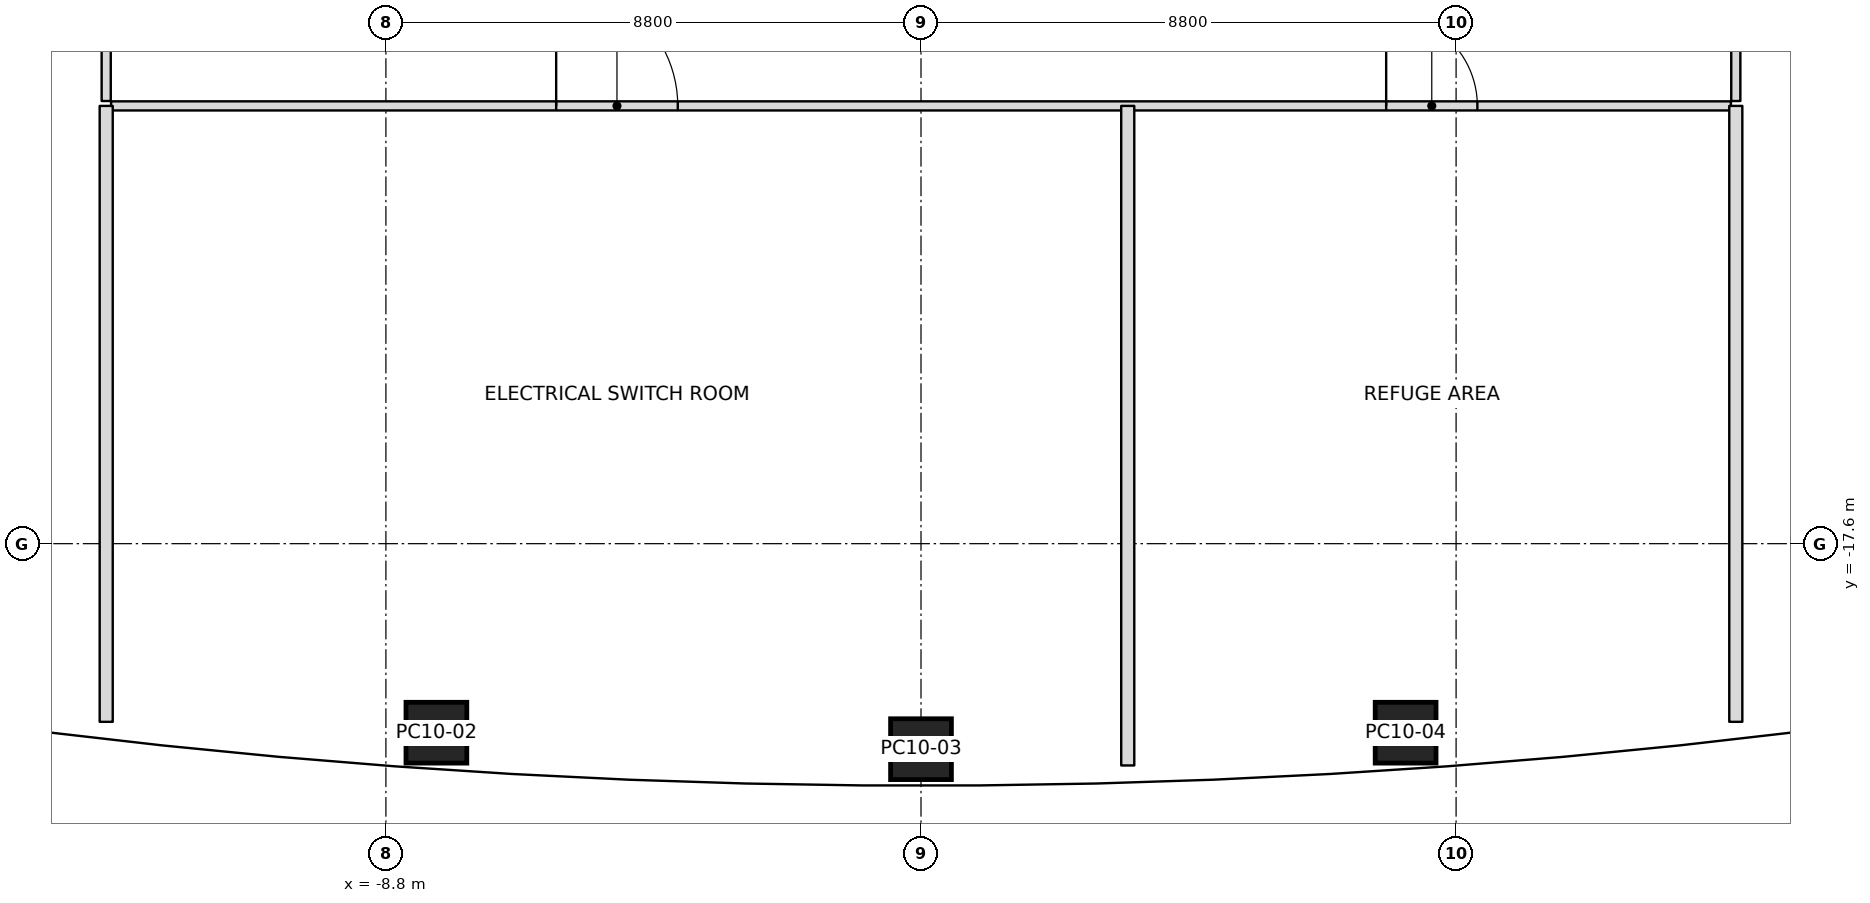
"""IFC4 building model, lengths in metres.
Left out: names, types, materials, properties, quantities, classifications, styles, units other than length and angle.
Written with IfcOpenShell. Run it as: python <this file> out.ifc"""

import sys

from ifc_helpers import new_model, si_unit, direction, frame, frame_2d, origin, origin_2d, place, context, subcontext, project, spatial, rectangle, extrude, clip, halfspace, element, fill, save


model = new_model("IFC4")
c1 = context("Model", 3, precision=1e-05, world=origin(), true_north=direction((0.0, 1.0)))
c2 = subcontext(c1, "Body", "Model", "MODEL_VIEW")
j1 = project(units=[si_unit("LENGTHUNIT", "METRE"), si_unit("PLANEANGLEUNIT", "RADIAN")], contexts=[c1])
p1 = place(None, origin())
s1 = spatial("IfcSite", under=j1, at=p1, CompositionType="ELEMENT")
p2 = place(p1, origin())
s2 = spatial("IfcBuilding", under=s1, at=p2, CompositionType="ELEMENT")
p3 = place(p2, frame((0.0, 0.0, 213.8)))
s3 = spatial("IfcBuildingStorey", under=s2, at=p3, CompositionType="ELEMENT", Elevation=213.8)
p4 = place(p3, frame((-7.97, -20.709, 0.0), z_axis=(0.005859111992, 0.007445954823, 0.999955113274), x_axis=(-0.997671899691, 0.067987281987, 0.005339480833)))
e1 = element("IfcColumn", 1, at=p4, inside=s3, PredefinedType="COLUMN", context=c2, shape_type="SweptSolid", body=[
    clip(clip(extrude(rectangle(XDim=1.0, YDim=1.0, at=origin_2d()), origin(), (0.0, 0.0, 1.0), 6.0), halfspace(frame((0.0, 0.0, 0.002)), True)), halfspace(frame((0.0, 0.0, 6.0)), False)),
])
p5 = place(p3, frame((0.0, -20.98, 0.0), z_axis=(0.0, 0.007608829216, 0.99997105244), x_axis=(1.0, 0.0, 0.0)))
e2 = element("IfcColumn", 2, at=p5, inside=s3, PredefinedType="COLUMN", context=c2, shape_type="SweptSolid", body=[
    clip(clip(extrude(rectangle(XDim=1.0, YDim=1.0, at=origin_2d()), origin(), (0.0, 0.0, 1.0), 6.0), halfspace(frame((0.0, 0.0, 0.001)), True)), halfspace(frame((0.0, 0.0, 6.0)), False)),
])
p6 = place(p3, frame((7.97, -20.709, 0.0), z_axis=(-0.005859111992, 0.007445954823, 0.999955113274), x_axis=(0.997671899691, 0.067987281987, 0.005339480833)))
e3 = element("IfcColumn", 3, at=p6, inside=s3, PredefinedType="COLUMN", context=c2, shape_type="SweptSolid", body=[
    clip(clip(extrude(rectangle(XDim=1.0, YDim=1.0, at=origin_2d()), origin(), (0.0, 0.0, 1.0), 6.0), halfspace(frame((0.0, 0.0, 0.002)), True)), halfspace(frame((0.0, 0.0, 6.0)), False)),
])
p7 = place(p3, frame((-13.4, -10.4, 0.0), z_axis=(0.0, 0.0, 1.0), x_axis=(0.0, -1.0, 0.0)))
e4 = element("IfcWall", 4, at=p7, inside=s3, PredefinedType="PARTITIONING", context=c2, shape_type="SweptSolid", body=[
    extrude(rectangle(XDim=10.13, YDim=0.215, at=frame_2d((5.065, 0.0))), origin(), (0.0, 0.0, 1.0), 5.234),
])
p8 = place(p3, frame((3.4, -10.4, 0.0), z_axis=(0.0, 0.0, 1.0), x_axis=(0.0, -1.0, 0.0)))
e5 = element("IfcWall", 5, at=p8, inside=s3, PredefinedType="PARTITIONING", context=c2, shape_type="SweptSolid", body=[
    extrude(rectangle(XDim=10.848, YDim=0.215, at=frame_2d((5.424, 0.0))), origin(), (0.0, 0.0, 1.0), 5.234),
])
p9 = place(p3, frame((13.4, -10.4, 0.0), z_axis=(0.0, 0.0, 1.0), x_axis=(0.0, -1.0, 0.0)))
e6 = element("IfcWall", 6, at=p9, inside=s3, PredefinedType="PARTITIONING", context=c2, shape_type="SweptSolid", body=[
    extrude(rectangle(XDim=10.13, YDim=0.215, at=frame_2d((5.065, 0.0))), origin(), (0.0, 0.0, 1.0), 5.234),
])
p10 = place(p3, frame((-13.4, 10.32, 0.0), z_axis=(0.0, 0.0, 1.0), x_axis=(0.0, -1.0, 0.0)))
e7 = element("IfcWall", 7, at=p10, inside=s3, PredefinedType="PARTITIONING", context=c2, shape_type="SweptSolid", body=[
    extrude(rectangle(XDim=20.64, YDim=0.15, at=frame_2d((10.32, 0.0))), origin(), (0.0, 0.0, 1.0), 5.233),
])
p11 = place(p10, frame((3.32, 0.0, 0.0)))
e8 = element("IfcOpeningElement", 8, at=p11, cuts=e7, PredefinedType="OPENING", context=c2, shape_type="SweptSolid", body=[
    extrude(rectangle(XDim=1.0, YDim=2.4, at=frame_2d((0.5, 1.2))), frame((0.0, 0.075, 0.0), z_axis=(0.0, -1.0, 0.0), x_axis=(1.0, 0.0, 0.0)), (0.0, 0.0, 1.0), 0.15),
])
p12 = place(p10, frame((13.23, 0.0, 0.0)))
e9 = element("IfcOpeningElement", 9, at=p12, cuts=e7, PredefinedType="OPENING", context=c2, shape_type="SweptSolid", body=[
    extrude(rectangle(XDim=2.0, YDim=2.4, at=frame_2d((1.0, 1.2))), frame((0.0, 0.075, 0.0), z_axis=(0.0, -1.0, 0.0), x_axis=(1.0, 0.0, 0.0)), (0.0, 0.0, 1.0), 0.15),
])
p13 = place(p3, frame((-13.32, -10.4, 0.0), z_axis=(0.0, 0.0, 1.0), x_axis=(1.0, 0.0, 0.0)))
e10 = element("IfcWall", 10, at=p13, inside=s3, PredefinedType="PARTITIONING", context=c2, shape_type="SweptSolid", body=[
    extrude(rectangle(XDim=26.64, YDim=0.15, at=frame_2d((13.32, 0.0))), origin(), (0.0, 0.0, 1.0), 5.317),
])
p14 = place(p13, frame((7.32, 0.0, 0.0)))
e11 = element("IfcOpeningElement", 11, at=p14, cuts=e10, PredefinedType="OPENING", context=c2, shape_type="SweptSolid", body=[
    extrude(rectangle(XDim=2.0, YDim=2.4, at=frame_2d((1.0, 1.2))), frame((0.0, 0.075, 0.0), z_axis=(0.0, -1.0, 0.0), x_axis=(1.0, 0.0, 0.0)), (0.0, 0.0, 1.0), 0.15),
])
p15 = place(p13, frame((20.97, 0.0, 0.0)))
e12 = element("IfcOpeningElement", 12, at=p15, cuts=e10, PredefinedType="OPENING", context=c2, shape_type="SweptSolid", body=[
    extrude(rectangle(XDim=1.5, YDim=2.4, at=frame_2d((0.75, 1.2))), frame((0.0, 0.075, 0.0), z_axis=(0.0, -1.0, 0.0), x_axis=(1.0, 0.0, 0.0)), (0.0, 0.0, 1.0), 0.15),
])
p16 = place(p3, frame((13.4, -10.32, 0.0), z_axis=(0.0, 0.0, 1.0), x_axis=(0.0, 1.0, 0.0)))
e13 = element("IfcWall", 13, at=p16, inside=s3, PredefinedType="PARTITIONING", context=c2, shape_type="SweptSolid", body=[
    extrude(rectangle(XDim=20.64, YDim=0.15, at=frame_2d((10.32, 0.0))), origin(), (0.0, 0.0, 1.0), 5.233),
])
p17 = place(p16, frame((14.97, 0.0, 0.0)))
e14 = element("IfcOpeningElement", 14, at=p17, cuts=e13, PredefinedType="OPENING", context=c2, shape_type="SweptSolid", body=[
    extrude(rectangle(XDim=1.5, YDim=2.4, at=frame_2d((0.75, 1.2))), frame((0.0, 0.075, 0.0), z_axis=(0.0, -1.0, 0.0), x_axis=(1.0, 0.0, 0.0)), (0.0, 0.0, 1.0), 0.15),
])
p18 = place(p16, frame((4.31, 0.0, 0.0)))
e15 = element("IfcOpeningElement", 15, at=p18, cuts=e13, PredefinedType="OPENING", context=c2, shape_type="SweptSolid", body=[
    extrude(rectangle(XDim=2.0, YDim=2.4, at=frame_2d((1.0, 1.2))), frame((0.0, 0.075, 0.0), z_axis=(0.0, -1.0, 0.0), x_axis=(1.0, 0.0, 0.0)), (0.0, 0.0, 1.0), 0.15),
])
p19 = place(p14, origin())
e16 = element("IfcDoor", 16, at=p19, inside=s3, OperationType="DOUBLE_DOOR_SINGLE_SWING", PredefinedType="DOOR", context=c2, shape_type="SweptSolid", body=[
    extrude(rectangle(XDim=2.0, YDim=2.4, at=frame_2d((1.0, 1.2))), frame((0.0, 0.025, 0.0), z_axis=(0.0, -1.0, 0.0), x_axis=(1.0, 0.0, 0.0)), (0.0, 0.0, 1.0), 0.05),
])
fill(e11, e16)
p20 = place(p15, origin())
e17 = element("IfcDoor", 17, at=p20, inside=s3, OperationType="DOUBLE_DOOR_SINGLE_SWING", PredefinedType="DOOR", context=c2, shape_type="SweptSolid", body=[
    extrude(rectangle(XDim=1.5, YDim=2.4, at=frame_2d((0.75, 1.2))), frame((0.0, 0.025, 0.0), z_axis=(0.0, -1.0, 0.0), x_axis=(1.0, 0.0, 0.0)), (0.0, 0.0, 1.0), 0.05),
])
fill(e12, e17)
save(model, sys.argv[1])
